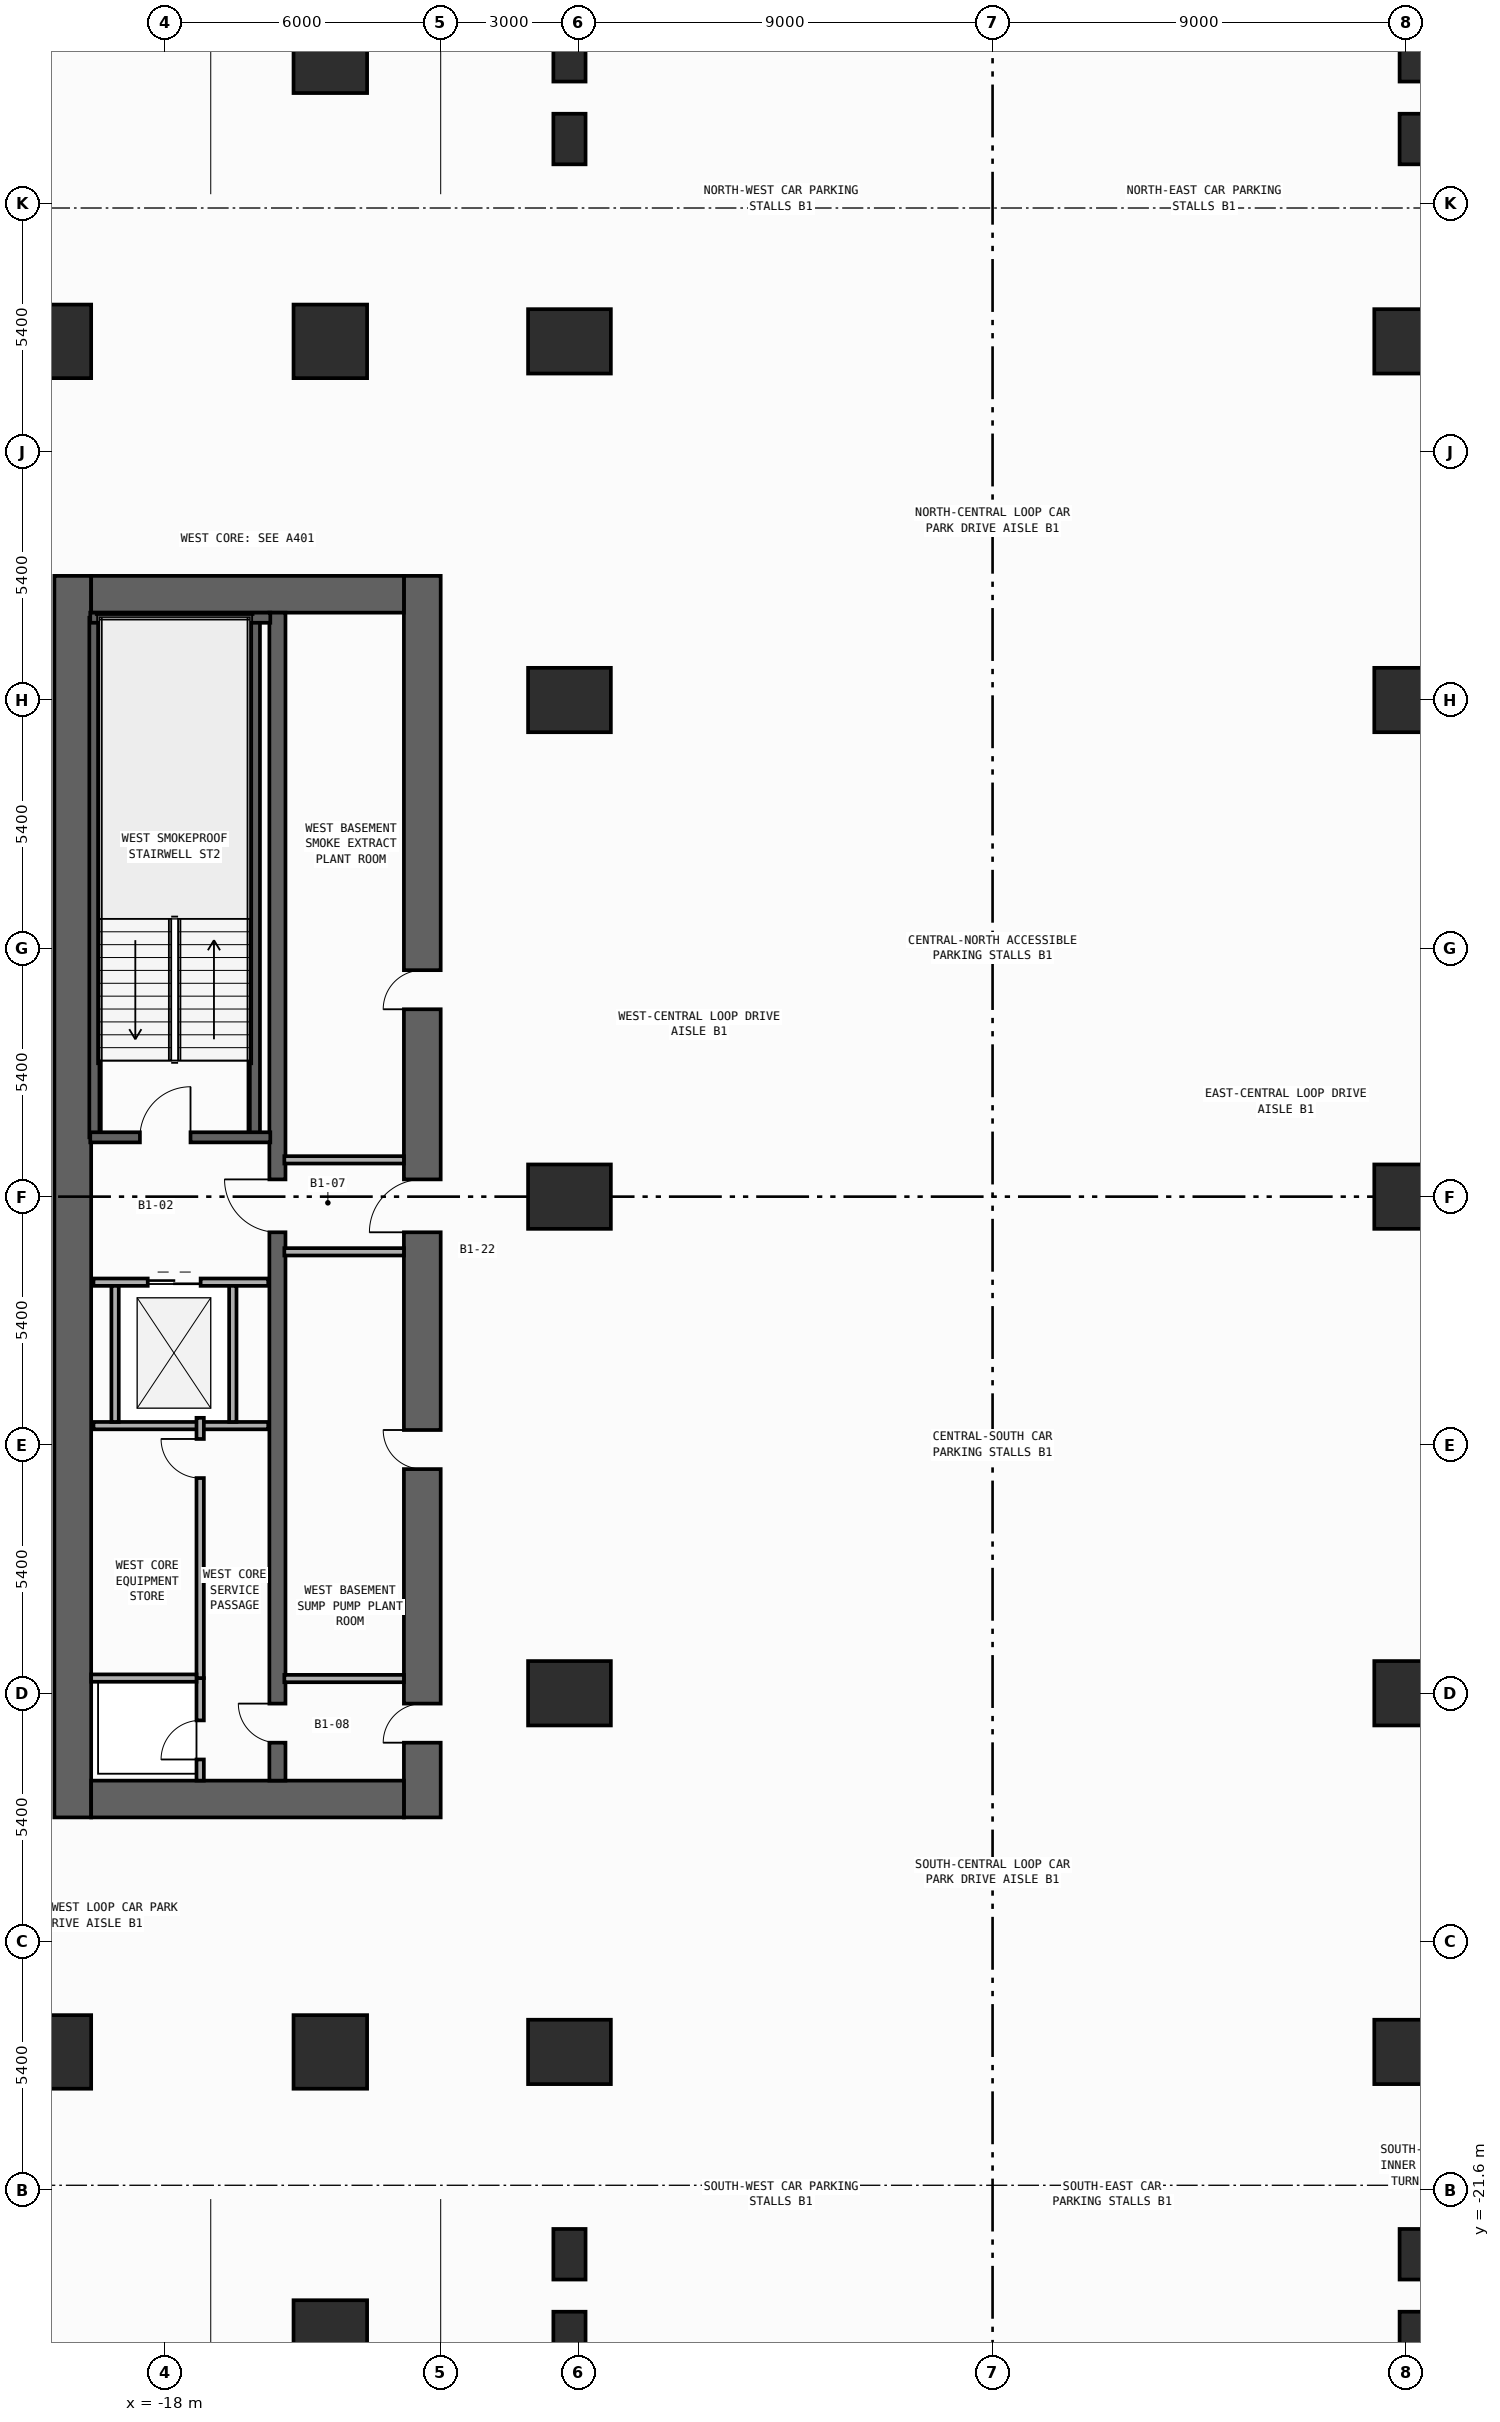
"""IFC4 building model, lengths in metres.
Left out: names, types, materials, properties, quantities, classifications, styles, units other than length and angle.
Written with IfcOpenShell. Run it as: python <this file> out.ifc"""

import sys

from ifc_helpers import new_model, si_unit, direction, frame, frame_2d, origin, origin_2d, place, context, subcontext, project, spatial, rectangle, extrude, element, fill, save


model = new_model("IFC4")
c1 = context("Model", 3, precision=1e-05, world=origin(), true_north=direction((0.0, 1.0)))
c2 = subcontext(c1, "Body", "Model", "MODEL_VIEW")
j1 = project(units=[si_unit("LENGTHUNIT", "METRE"), si_unit("PLANEANGLEUNIT", "RADIAN")], contexts=[c1])
p1 = place(None, origin())
s1 = spatial("IfcSite", under=j1, at=p1, CompositionType="ELEMENT")
p2 = place(p1, origin())
s2 = spatial("IfcBuilding", under=s1, at=p2, CompositionType="ELEMENT")
p3 = place(p2, frame((0.0, 0.0, -4.5)))
s3 = spatial("IfcBuildingStorey", under=s2, at=p3, CompositionType="ELEMENT", Elevation=-4.5)
p4 = place(p3, frame((-20.0, -13.5, 0.0), z_axis=(0.0, 0.0, 1.0), x_axis=(0.0, 1.0, 0.0)))
e1 = element("IfcWall", 1, at=p4, inside=s3, PredefinedType="SHEAR", context=c2, shape_type="SweptSolid", body=[
    extrude(rectangle(XDim=27.0, YDim=0.8, at=frame_2d((13.5, 0.0))), origin(), (0.0, 0.0, 1.0), 4.2),
])
p5 = place(p3, frame((-12.4, -13.5, 0.0), z_axis=(0.0, 0.0, 1.0), x_axis=(0.0, 1.0, 0.0)))
e2 = element("IfcWall", 2, at=p5, inside=s3, PredefinedType="SHEAR", context=c2, shape_type="SweptSolid", body=[
    extrude(rectangle(XDim=27.0, YDim=0.8, at=frame_2d((13.5, 0.0))), origin(), (0.0, 0.0, 1.0), 4.2),
])
p6 = place(p5, frame((17.575, 0.0, 0.0)))
e3 = element("IfcOpeningElement", 3, at=p6, cuts=e2, PredefinedType="OPENING", context=c2, shape_type="SweptSolid", body=[
    extrude(rectangle(XDim=0.85, YDim=2.1, at=frame_2d((0.425, 1.05))), frame((0.0, 0.41, 0.0), z_axis=(0.0, -1.0, 0.0), x_axis=(1.0, 0.0, 0.0)), (0.0, 0.0, 1.0), 0.82),
])
p7 = place(p5, frame((7.575, 0.0, 0.0)))
e4 = element("IfcOpeningElement", 4, at=p7, cuts=e2, PredefinedType="OPENING", context=c2, shape_type="SweptSolid", body=[
    extrude(rectangle(XDim=0.85, YDim=2.1, at=frame_2d((0.425, 1.05))), frame((0.0, 0.41, 0.0), z_axis=(0.0, -1.0, 0.0), x_axis=(1.0, 0.0, 0.0)), (0.0, 0.0, 1.0), 0.82),
])
p8 = place(p5, frame((12.725, 0.0, 0.0)))
e5 = element("IfcOpeningElement", 5, at=p8, cuts=e2, PredefinedType="OPENING", context=c2, shape_type="SweptSolid", body=[
    extrude(rectangle(XDim=1.15, YDim=2.2, at=frame_2d((0.575, 1.1))), frame((0.0, 0.41, 0.0), z_axis=(0.0, -1.0, 0.0), x_axis=(1.0, 0.0, 0.0)), (0.0, 0.0, 1.0), 0.82),
])
p9 = place(p5, frame((1.625, 0.0, 0.0)))
e6 = element("IfcOpeningElement", 6, at=p9, cuts=e2, PredefinedType="OPENING", context=c2, shape_type="SweptSolid", body=[
    extrude(rectangle(XDim=0.85, YDim=2.1, at=frame_2d((0.425, 1.05))), frame((0.0, 0.41, 0.0), z_axis=(0.0, -1.0, 0.0), x_axis=(1.0, 0.0, 0.0)), (0.0, 0.0, 1.0), 0.82),
])
for number, where, z_axis, x_axis in (
    (7, (-19.6, -13.1, 0.0), (0.0, 0.0, 1.0), (1.0, 0.0, 0.0)),
    (8, (-19.6, 13.1, 0.0), (0.0, 0.0, 1.0), (1.0, 0.0, 0.0)),
):
    element("IfcWall", number, at=place(p3, frame(where, z_axis=z_axis, x_axis=x_axis)), inside=s3, PredefinedType="SHEAR", context=c2, shape_type="SweptSolid", body=[
        extrude(rectangle(XDim=6.8, YDim=0.8, at=frame_2d((3.4, 0.0))), origin(), (0.0, 0.0, 1.0), 4.2),
    ])
p10 = place(p3, frame((-15.55, -12.7, 0.0), z_axis=(0.0, 0.0, 1.0), x_axis=(0.0, 1.0, 0.0)))
e9 = element("IfcWall", 9, at=p10, inside=s3, PredefinedType="SHEAR", context=c2, shape_type="SweptSolid", body=[
    extrude(rectangle(XDim=25.4, YDim=0.35, at=frame_2d((12.7, 0.0))), origin(), (0.0, 0.0, 1.0), 4.2),
])
p11 = place(p10, frame((11.925, 0.0, 0.0)))
e10 = element("IfcOpeningElement", 10, at=p11, cuts=e9, PredefinedType="OPENING", context=c2, shape_type="SweptSolid", body=[
    extrude(rectangle(XDim=1.15, YDim=2.2, at=frame_2d((0.575, 1.1))), frame((0.0, 0.185, 0.0), z_axis=(0.0, -1.0, 0.0), x_axis=(1.0, 0.0, 0.0)), (0.0, 0.0, 1.0), 0.37),
])
p12 = place(p10, frame((0.825, 0.0, 0.0)))
e11 = element("IfcOpeningElement", 11, at=p12, cuts=e9, PredefinedType="OPENING", context=c2, shape_type="SweptSolid", body=[
    extrude(rectangle(XDim=0.85, YDim=2.1, at=frame_2d((0.425, 1.05))), frame((0.0, 0.185, 0.0), z_axis=(0.0, -1.0, 0.0), x_axis=(1.0, 0.0, 0.0)), (0.0, 0.0, 1.0), 0.37),
])
for number, where, z_axis, x_axis in (
    (12, (-16.04, 1.29, 0.0), (0.0, 0.0, 1.0), (0.0, 1.0, 0.0)),
    (13, (-19.53, 1.29, 0.0), (0.0, 0.0, 1.0), (0.0, 1.0, 0.0)),
):
    element("IfcWall", number, at=place(p3, frame(where, z_axis=z_axis, x_axis=x_axis)), inside=s3, PredefinedType="SHEAR", context=c2, shape_type="SweptSolid", body=[
        extrude(rectangle(XDim=11.3, YDim=0.22, at=frame_2d((5.65, 0.0))), origin(), (0.0, 0.0, 1.0), 4.2),
    ])
p13 = place(p3, frame((-19.62, 12.59, 0.0), z_axis=(0.0, 0.0, 1.0), x_axis=(1.0, 0.0, 0.0)))
e14 = element("IfcWall", 14, at=p13, inside=s3, PredefinedType="SHEAR", context=c2, shape_type="SweptSolid", body=[
    extrude(rectangle(XDim=3.915, YDim=0.22, at=frame_2d((1.958, 0.0))), origin(), (0.0, 0.0, 1.0), 4.2),
])
p14 = place(p3, frame((-19.62, 1.29, 0.0), z_axis=(0.0, 0.0, 1.0), x_axis=(1.0, 0.0, 0.0)))
e15 = element("IfcWall", 15, at=p14, inside=s3, PredefinedType="SHEAR", context=c2, shape_type="SweptSolid", body=[
    extrude(rectangle(XDim=3.915, YDim=0.22, at=frame_2d((1.958, 0.0))), origin(), (0.0, 0.0, 1.0), 4.2),
])
p15 = place(p14, frame((1.08, 0.0, 0.0)))
e16 = element("IfcOpeningElement", 16, at=p15, cuts=e15, PredefinedType="OPENING", context=c2, shape_type="SweptSolid", body=[
    extrude(rectangle(XDim=1.1, YDim=2.2, at=frame_2d((0.55, 1.1))), frame((0.0, 0.12, 0.0), z_axis=(0.0, -1.0, 0.0), x_axis=(1.0, 0.0, 0.0)), (0.0, 0.0, 1.0), 0.24),
])
for number, where, z_axis, x_axis in (
    (17, (-9.2, -18.6, 0.0), (0.0, 0.0, 1.0), (1.0, 0.0, 0.0)),
    (18, (-9.2, -10.8, 0.0), (0.0, 0.0, 1.0), (1.0, 0.0, 0.0)),
    (19, (-9.2, 0.0, 0.0), (0.0, 0.0, 1.0), (1.0, 0.0, 0.0)),
    (20, (-9.2, 10.8, 0.0), (0.0, 0.0, 1.0), (1.0, 0.0, 0.0)),
    (21, (-9.2, 18.6, 0.0), (0.0, 0.0, 1.0), (1.0, 0.0, 0.0)),
    (22, (9.2, -18.6, 0.0), (0.0, 0.0, 1.0), (1.0, 0.0, 0.0)),
    (23, (9.2, -10.8, 0.0), (0.0, 0.0, 1.0), (1.0, 0.0, 0.0)),
    (24, (9.2, 0.0, 0.0), (0.0, 0.0, 1.0), (1.0, 0.0, 0.0)),
    (25, (9.2, 10.8, 0.0), (0.0, 0.0, 1.0), (1.0, 0.0, 0.0)),
    (26, (9.2, 18.6, 0.0), (0.0, 0.0, 1.0), (1.0, 0.0, 0.0)),
):
    element("IfcColumn", number, at=place(p3, frame(where, z_axis=z_axis, x_axis=x_axis)), inside=s3, PredefinedType="COLUMN", context=c2, shape_type="SweptSolid", body=[
        extrude(rectangle(XDim=1.8, YDim=1.4, at=origin_2d()), origin(), (0.0, 0.0, 1.0), 4.5),
    ])
for number, where, z_axis, x_axis in (
    (27, (-20.4, -18.6, 0.0), (0.0, 0.0, 1.0), (1.0, 0.0, 0.0)),
    (28, (-20.4, 18.6, 0.0), (0.0, 0.0, 1.0), (1.0, 0.0, 0.0)),
    (29, (-14.4, -18.6, 0.0), (0.0, 0.0, 1.0), (1.0, 0.0, 0.0)),
    (30, (-14.4, 18.6, 0.0), (0.0, 0.0, 1.0), (1.0, 0.0, 0.0)),
):
    element("IfcColumn", number, at=place(p3, frame(where, z_axis=z_axis, x_axis=x_axis)), inside=s3, PredefinedType="COLUMN", context=c2, shape_type="SweptSolid", body=[
        extrude(rectangle(XDim=1.6, YDim=1.6, at=origin_2d()), origin(), (0.0, 0.0, 1.0), 4.5),
    ])
for number, where, z_axis, x_axis in (
    (31, (-9.2, -24.8, 0.0), (0.0, 0.0, 1.0), (1.0, 0.0, 0.0)),
    (32, (-9.2, 24.8, 0.0), (0.0, 0.0, 1.0), (1.0, 0.0, 0.0)),
    (33, (9.2, -24.8, 0.0), (0.0, 0.0, 1.0), (1.0, 0.0, 0.0)),
    (34, (9.2, 24.8, 0.0), (0.0, 0.0, 1.0), (1.0, 0.0, 0.0)),
):
    element("IfcColumn", number, at=place(p3, frame(where, z_axis=z_axis, x_axis=x_axis)), inside=s3, PredefinedType="PILASTER", context=c2, shape_type="SweptSolid", body=[
        extrude(rectangle(XDim=0.7, YDim=1.1, at=origin_2d()), origin(), (0.0, 0.0, 1.0), 4.5),
    ])
for number, where, z_axis, x_axis in (
    (35, (-14.4, -24.8, 0.0), (0.0, 0.0, 1.0), (1.0, 0.0, 0.0)),
    (36, (-14.4, 24.8, 0.0), (0.0, 0.0, 1.0), (1.0, 0.0, 0.0)),
):
    element("IfcColumn", number, at=place(p3, frame(where, z_axis=z_axis, x_axis=x_axis)), inside=s3, PredefinedType="COLUMN", context=c2, shape_type="SweptSolid", body=[
        extrude(rectangle(XDim=1.6, YDim=1.6, at=origin_2d()), origin(), (0.0, 0.0, 1.0), 4.5),
    ])
for number, where, z_axis, x_axis in (
    (37, (-9.2, -23.0, 0.0), (0.0, 0.0, 1.0), (1.0, 0.0, 0.0)),
    (38, (-9.2, 23.0, 0.0), (0.0, 0.0, 1.0), (1.0, 0.0, 0.0)),
    (39, (9.2, -23.0, 0.0), (0.0, 0.0, 1.0), (1.0, 0.0, 0.0)),
    (40, (9.2, 23.0, 0.0), (0.0, 0.0, 1.0), (1.0, 0.0, 0.0)),
):
    element("IfcColumn", number, at=place(p3, frame(where, z_axis=z_axis, x_axis=x_axis)), inside=s3, PredefinedType="PILASTER", context=c2, shape_type="SweptSolid", body=[
        extrude(rectangle(XDim=0.7, YDim=1.1, at=origin_2d()), origin(), (0.0, 0.0, 1.0), 4.5),
    ])
p16 = place(p3, frame((-19.55, -1.86, 0.0), z_axis=(0.0, 0.0, 1.0), x_axis=(1.0, 0.0, 0.0)))
e41 = element("IfcWall", 41, at=p16, inside=s3, PredefinedType="STANDARD", context=c2, shape_type="SweptSolid", body=[
    extrude(rectangle(XDim=3.8, YDim=0.16, at=frame_2d((1.9, 0.0))), origin(), (0.0, 0.0, 1.0), 4.2),
])
p17 = place(p16, frame((1.18, 0.0, 0.0)))
e42 = element("IfcOpeningElement", 42, at=p17, cuts=e41, PredefinedType="OPENING", context=c2, shape_type="SweptSolid", body=[
    extrude(rectangle(XDim=1.15, YDim=2.2, at=frame_2d((0.575, 1.1))), frame((0.0, 0.09, 0.0), z_axis=(0.0, -1.0, 0.0), x_axis=(1.0, 0.0, 0.0)), (0.0, 0.0, 1.0), 0.18),
])
p18 = place(p3, frame((-19.55, -4.98, 0.0), z_axis=(0.0, 0.0, 1.0), x_axis=(1.0, 0.0, 0.0)))
e43 = element("IfcWall", 43, at=p18, inside=s3, PredefinedType="STANDARD", context=c2, shape_type="SweptSolid", body=[
    extrude(rectangle(XDim=3.8, YDim=0.16, at=frame_2d((1.9, 0.0))), origin(), (0.0, 0.0, 1.0), 4.2),
])
for number, where, z_axis, x_axis in (
    (44, (-19.08, -4.9, 0.0), (0.0, 0.0, 1.0), (0.0, 1.0, 0.0)),
    (45, (-16.52, -4.9, 0.0), (0.0, 0.0, 1.0), (0.0, 1.0, 0.0)),
):
    element("IfcWall", number, at=place(p3, frame(where, z_axis=z_axis, x_axis=x_axis)), inside=s3, PredefinedType="STANDARD", context=c2, shape_type="SweptSolid", body=[
        extrude(rectangle(XDim=2.96, YDim=0.16, at=frame_2d((1.48, 0.0))), origin(), (0.0, 0.0, 1.0), 4.2),
    ])
for number, where, z_axis, x_axis in (
    (46, (-15.4, 0.8, 0.0), (0.0, 0.0, 1.0), (1.0, 0.0, 0.0)),
    (47, (-15.4, -1.2, 0.0), (0.0, 0.0, 1.0), (1.0, 0.0, 0.0)),
    (48, (-15.4, -10.48, 0.0), (0.0, 0.0, 1.0), (1.0, 0.0, 0.0)),
):
    element("IfcWall", number, at=place(p3, frame(where, z_axis=z_axis, x_axis=x_axis)), inside=s3, PredefinedType="STANDARD", context=c2, shape_type="SweptSolid", body=[
        extrude(rectangle(XDim=2.6, YDim=0.16, at=frame_2d((1.3, 0.0))), origin(), (0.0, 0.0, 1.0), 4.2),
    ])
p19 = place(p3, frame((-17.23, -12.7, 0.0), z_axis=(0.0, 0.0, 1.0), x_axis=(0.0, 1.0, 0.0)))
e49 = element("IfcWall", 49, at=p19, inside=s3, PredefinedType="PARTITIONING", context=c2, shape_type="SweptSolid", body=[
    extrude(rectangle(XDim=2.23, YDim=0.16, at=frame_2d((1.115, 0.0))), origin(), (0.0, 0.0, 1.0), 4.2),
])
p20 = place(p19, frame((0.46, 0.0, 0.0)))
e50 = element("IfcOpeningElement", 50, at=p20, cuts=e49, PredefinedType="OPENING", context=c2, shape_type="SweptSolid", body=[
    extrude(rectangle(XDim=0.85, YDim=2.1, at=frame_2d((0.425, 1.05))), frame((0.0, 0.09, 0.0), z_axis=(0.0, -1.0, 0.0), x_axis=(1.0, 0.0, 0.0)), (0.0, 0.0, 1.0), 0.18),
])
p21 = place(p3, frame((-17.23, -10.47, 0.0), z_axis=(0.0, 0.0, 1.0), x_axis=(0.0, 1.0, 0.0)))
e51 = element("IfcWall", 51, at=p21, inside=s3, PredefinedType="PARTITIONING", context=c2, shape_type="SweptSolid", body=[
    extrude(rectangle(XDim=5.66, YDim=0.16, at=frame_2d((2.83, 0.0))), origin(), (0.0, 0.0, 1.0), 4.2),
])
p22 = place(p21, frame((4.35, 0.0, 0.0)))
e52 = element("IfcOpeningElement", 52, at=p22, cuts=e51, PredefinedType="OPENING", context=c2, shape_type="SweptSolid", body=[
    extrude(rectangle(XDim=0.85, YDim=2.1, at=frame_2d((0.425, 1.05))), frame((0.0, 0.09, 0.0), z_axis=(0.0, -1.0, 0.0), x_axis=(1.0, 0.0, 0.0)), (0.0, 0.0, 1.0), 0.18),
])
p23 = place(p3, frame((-19.6, -10.47, 0.0), z_axis=(0.0, 0.0, 1.0), x_axis=(1.0, 0.0, 0.0)))
e53 = element("IfcWall", 53, at=p23, inside=s3, PredefinedType="PARTITIONING", context=c2, shape_type="SweptSolid", body=[
    extrude(rectangle(XDim=2.29, YDim=0.16, at=frame_2d((1.145, 0.0))), origin(), (0.0, 0.0, 1.0), 4.2),
])
p24 = place(p15, origin())
e54 = element("IfcDoor", 54, at=p24, inside=s3, OperationType="SINGLE_SWING_RIGHT", PredefinedType="DOOR", context=c2, shape_type="SweptSolid", body=[
    extrude(rectangle(XDim=1.1, YDim=2.2, at=frame_2d((0.55, 1.1))), frame((0.0, 0.025, 0.0), z_axis=(0.0, -1.0, 0.0), x_axis=(1.0, 0.0, 0.0)), (0.0, 0.0, 1.0), 0.05),
])
fill(e16, e54)
p25 = place(p6, origin())
e55 = element("IfcDoor", 55, at=p25, inside=s3, OperationType="SINGLE_SWING_LEFT", PredefinedType="DOOR", context=c2, shape_type="SweptSolid", body=[
    extrude(rectangle(XDim=0.85, YDim=2.1, at=frame_2d((0.425, 1.05))), frame((0.0, 0.025, 0.0), z_axis=(0.0, -1.0, 0.0), x_axis=(1.0, 0.0, 0.0)), (0.0, 0.0, 1.0), 0.05),
])
fill(e3, e55)
p26 = place(p7, origin())
e56 = element("IfcDoor", 56, at=p26, inside=s3, OperationType="SINGLE_SWING_RIGHT", PredefinedType="DOOR", context=c2, shape_type="SweptSolid", body=[
    extrude(rectangle(XDim=0.85, YDim=2.1, at=frame_2d((0.425, 1.05))), frame((0.0, 0.025, 0.0), z_axis=(0.0, -1.0, 0.0), x_axis=(1.0, 0.0, 0.0)), (0.0, 0.0, 1.0), 0.05),
])
fill(e4, e56)
p27 = place(p8, origin())
e57 = element("IfcDoor", 57, at=p27, inside=s3, OperationType="SINGLE_SWING_LEFT", PredefinedType="DOOR", context=c2, shape_type="SweptSolid", body=[
    extrude(rectangle(XDim=1.15, YDim=2.2, at=frame_2d((0.575, 1.1))), frame((0.0, 0.025, 0.0), z_axis=(0.0, -1.0, 0.0), x_axis=(1.0, 0.0, 0.0)), (0.0, 0.0, 1.0), 0.05),
])
fill(e5, e57)
p28 = place(p11, origin())
e58 = element("IfcDoor", 58, at=p28, inside=s3, OperationType="SINGLE_SWING_RIGHT", PredefinedType="DOOR", context=c2, shape_type="SweptSolid", body=[
    extrude(rectangle(XDim=1.15, YDim=2.2, at=frame_2d((0.575, 1.1))), frame((0.0, 0.025, 0.0), z_axis=(0.0, -1.0, 0.0), x_axis=(1.0, 0.0, 0.0)), (0.0, 0.0, 1.0), 0.05),
])
fill(e10, e58)
p29 = place(p9, origin())
e59 = element("IfcDoor", 59, at=p29, inside=s3, OperationType="SINGLE_SWING_LEFT", PredefinedType="DOOR", context=c2, shape_type="SweptSolid", body=[
    extrude(rectangle(XDim=0.85, YDim=2.1, at=frame_2d((0.425, 1.05))), frame((0.0, 0.025, 0.0), z_axis=(0.0, -1.0, 0.0), x_axis=(1.0, 0.0, 0.0)), (0.0, 0.0, 1.0), 0.05),
])
fill(e6, e59)
p30 = place(p12, origin())
e60 = element("IfcDoor", 60, at=p30, inside=s3, OperationType="SINGLE_SWING_RIGHT", PredefinedType="DOOR", context=c2, shape_type="SweptSolid", body=[
    extrude(rectangle(XDim=0.85, YDim=2.1, at=frame_2d((0.425, 1.05))), frame((0.0, 0.025, 0.0), z_axis=(0.0, -1.0, 0.0), x_axis=(1.0, 0.0, 0.0)), (0.0, 0.0, 1.0), 0.05),
])
fill(e11, e60)
p31 = place(p17, origin())
e61 = element("IfcDoor", 61, at=p31, inside=s3, OperationType="DOUBLE_DOOR_SLIDING", PredefinedType="DOOR", context=c2, shape_type="SweptSolid", body=[
    extrude(rectangle(XDim=1.15, YDim=2.2, at=frame_2d((0.575, 1.1))), frame((0.0, 0.025, 0.0), z_axis=(0.0, -1.0, 0.0), x_axis=(1.0, 0.0, 0.0)), (0.0, 0.0, 1.0), 0.05),
])
fill(e42, e61)
p32 = place(p20, origin())
e62 = element("IfcDoor", 62, at=p32, inside=s3, OperationType="SINGLE_SWING_LEFT", PredefinedType="DOOR", context=c2, shape_type="SweptSolid", body=[
    extrude(rectangle(XDim=0.85, YDim=2.1, at=frame_2d((0.425, 1.05))), frame((0.0, 0.025, 0.0), z_axis=(0.0, -1.0, 0.0), x_axis=(1.0, 0.0, 0.0)), (0.0, 0.0, 1.0), 0.05),
])
fill(e50, e62)
p33 = place(p22, origin())
e63 = element("IfcDoor", 63, at=p33, inside=s3, OperationType="SINGLE_SWING_RIGHT", PredefinedType="DOOR", context=c2, shape_type="SweptSolid", body=[
    extrude(rectangle(XDim=0.85, YDim=2.1, at=frame_2d((0.425, 1.05))), frame((0.0, 0.025, 0.0), z_axis=(0.0, -1.0, 0.0), x_axis=(1.0, 0.0, 0.0)), (0.0, 0.0, 1.0), 0.05),
])
fill(e52, e63)
save(model, sys.argv[1])
